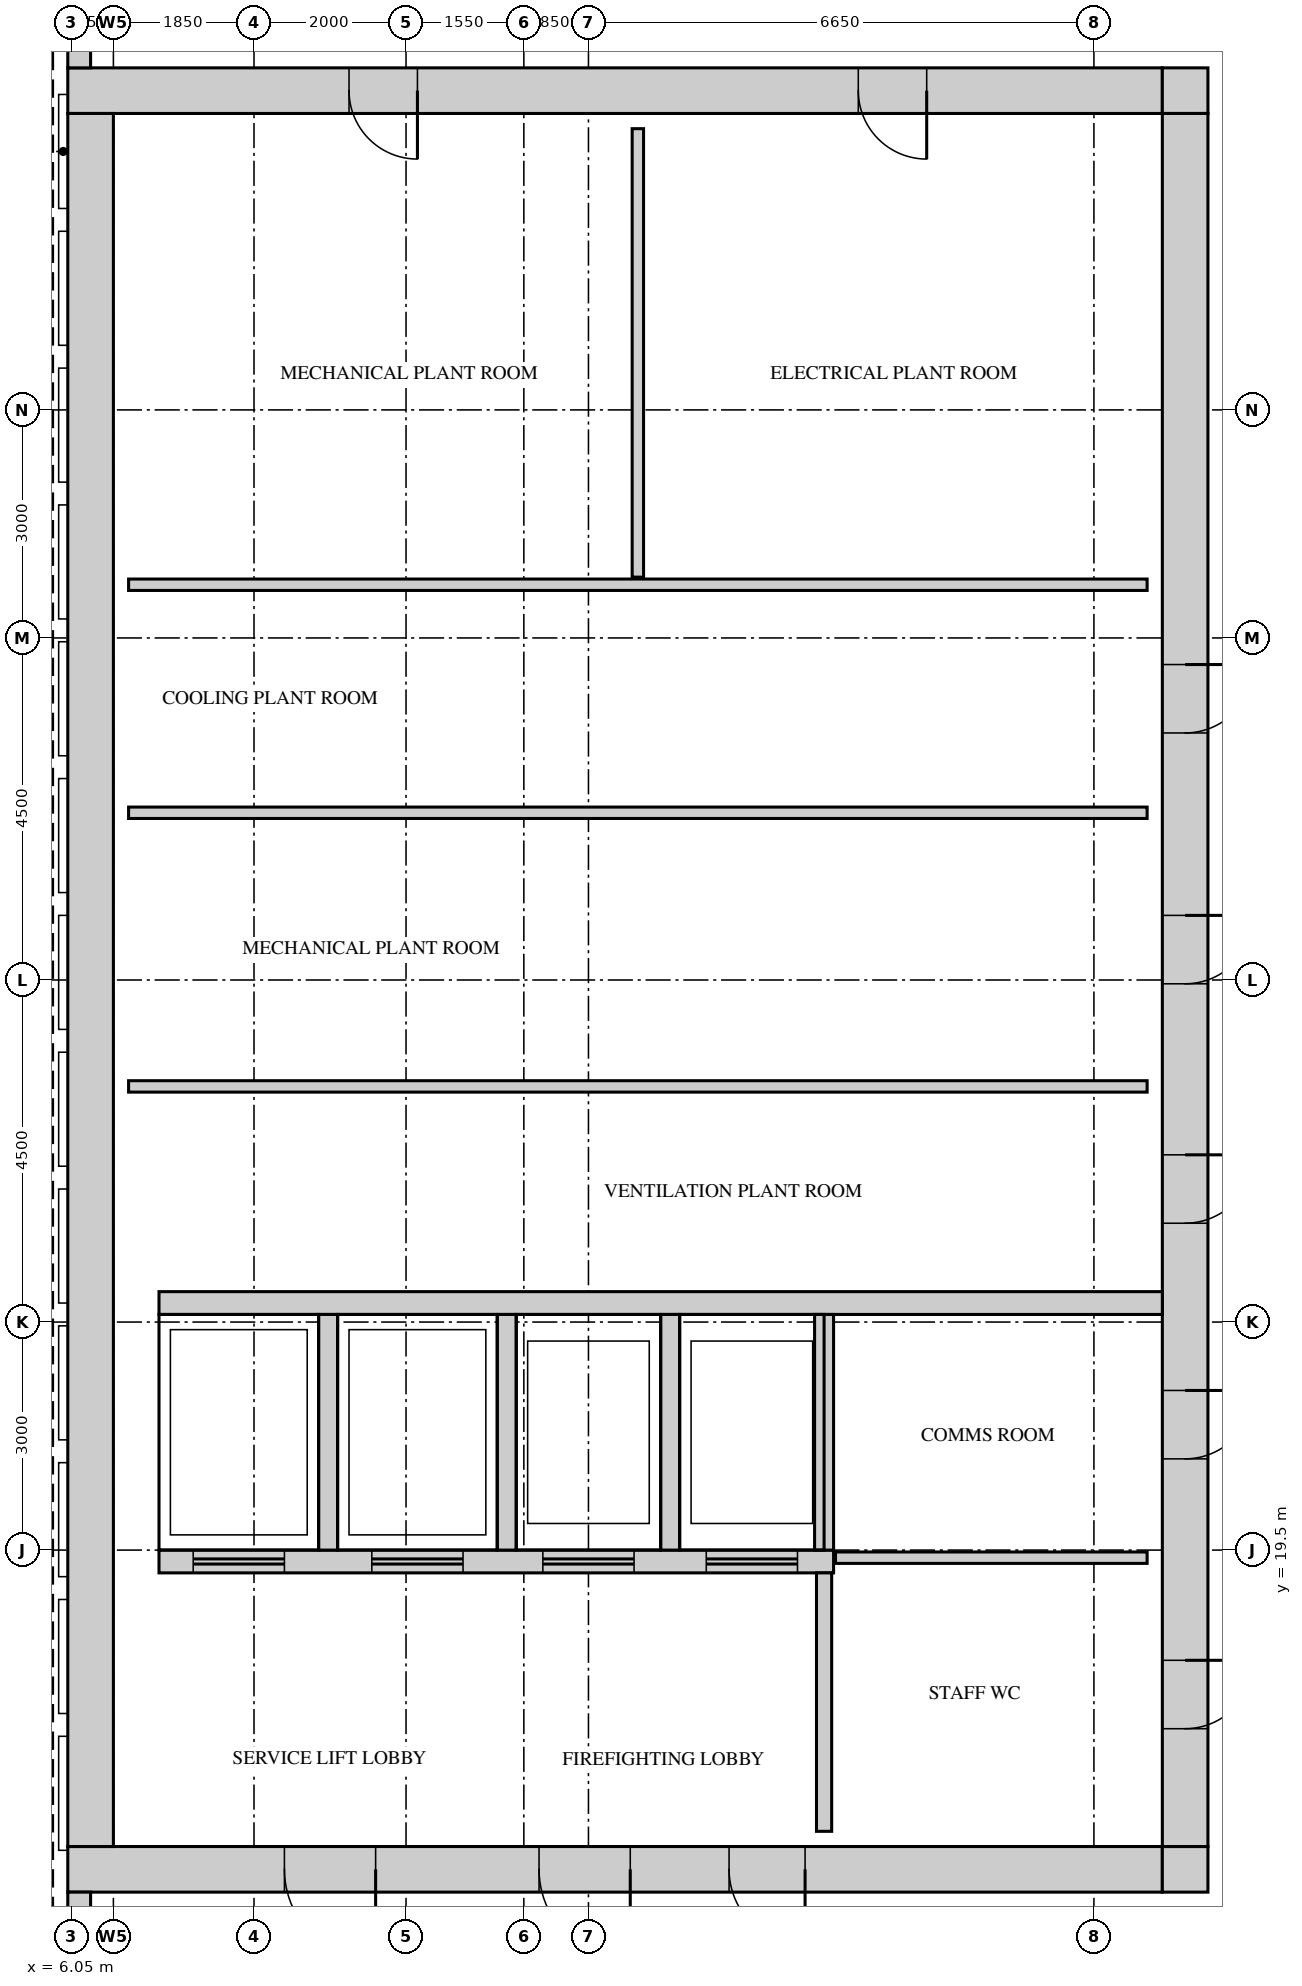
"""IFC4 building model, lengths in metres.
Left out: names, types, materials, properties, quantities, classifications, styles, units other than length and angle.
Written with IfcOpenShell. Run it as: python <this file> out.ifc"""

import sys

from ifc_helpers import new_model, si_unit, direction, frame, frame_2d, origin, place, context, subcontext, project, spatial, rectangle, extrude, source, transform, mapped, element, fill, save


model = new_model("IFC4")
c1 = context("Model", 3, precision=1e-05, world=origin(), true_north=direction((0.0, 1.0)))
c2 = subcontext(c1, "Body", "Model", "MODEL_VIEW")
j1 = project(units=[si_unit("LENGTHUNIT", "METRE"), si_unit("PLANEANGLEUNIT", "RADIAN")], contexts=[c1])
p1 = place(None, origin())
s1 = spatial("IfcSite", under=j1, at=p1, CompositionType="ELEMENT")
p2 = place(p1, origin())
s2 = spatial("IfcBuilding", under=s1, at=p2, CompositionType="ELEMENT")
p3 = place(p2, frame((0.0, 0.0, 348.2)))
s3 = spatial("IfcBuildingStorey", under=s2, at=p3, CompositionType="ELEMENT", Elevation=348.2)
m1 = source(origin(), c2, "Body", "SweptSolid", [
    extrude(rectangle(XDim=14.4, YDim=0.6, at=frame_2d((7.2, 0.0))), origin(), (0.0, 0.0, 1.0), 4.25),
])
p4 = place(p3, frame((6.0, 38.7, 0.0), z_axis=(0.0, 0.0, 1.0), x_axis=(1.0, 0.0, 0.0)))
e1 = element("IfcWall", 1, at=p4, inside=s3, PredefinedType="SHEAR", context=c2, shape_type="MappedRepresentation", body=[
    mapped(m1, transform((0.0, 0.0, 0.0))),
])
m2 = source(origin(), c2, "Body", "SweptSolid", [
    extrude(rectangle(XDim=0.9, YDim=2.1, at=frame_2d((0.45, 1.05))), frame((0.0, 0.31, 0.0), z_axis=(0.0, -1.0, 0.0), x_axis=(1.0, 0.0, 0.0)), (0.0, 0.0, 1.0), 0.62),
])
p5 = place(p4, frame((3.7, 0.0, 0.0)))
e2 = element("IfcOpeningElement", 2, at=p5, cuts=e1, PredefinedType="OPENING", context=c2, shape_type="MappedRepresentation", body=[
    mapped(m2, transform((0.0, 0.0, 0.0))),
])
p6 = place(p4, frame((10.4, 0.0, 0.0)))
e3 = element("IfcOpeningElement", 3, at=p6, cuts=e1, PredefinedType="OPENING", context=c2, shape_type="MappedRepresentation", body=[
    mapped(m2, transform((0.0, 0.0, 0.0))),
])
m3 = source(origin(), c2, "Body", "SweptSolid", [
    extrude(rectangle(XDim=0.6, YDim=0.6, at=frame_2d((0.3, 0.0))), origin(), (0.0, 0.0, 1.0), 4.25),
])
p7 = place(p3, frame((20.4, 38.7, 0.0), z_axis=(0.0, 0.0, 1.0), x_axis=(1.0, 0.0, 0.0)))
e4 = element("IfcWall", 4, at=p7, inside=s3, PredefinedType="SHEAR", context=c2, shape_type="MappedRepresentation", body=[
    mapped(m3, transform((0.0, 0.0, 0.0))),
])
p8 = place(p3, frame((6.0, 15.3, 0.0), z_axis=(0.0, 0.0, 1.0), x_axis=(1.0, 0.0, 0.0)))
e5 = element("IfcWall", 5, at=p8, inside=s3, PredefinedType="SHEAR", context=c2, shape_type="MappedRepresentation", body=[
    mapped(m1, transform((0.0, 0.0, 0.0))),
])
m4 = source(origin(), c2, "Body", "SweptSolid", [
    extrude(rectangle(XDim=1.2, YDim=2.1, at=frame_2d((0.6, 1.05))), frame((0.0, 0.31, 0.0), z_axis=(0.0, -1.0, 0.0), x_axis=(1.0, 0.0, 0.0)), (0.0, 0.0, 1.0), 0.62),
])
p9 = place(p8, frame((6.2, 0.0, 0.0)))
e6 = element("IfcOpeningElement", 6, at=p9, cuts=e5, PredefinedType="OPENING", context=c2, shape_type="MappedRepresentation", body=[
    mapped(m4, transform((0.0, 0.0, 0.0))),
])
p10 = place(p8, frame((2.85, 0.0, 0.0)))
e7 = element("IfcOpeningElement", 7, at=p10, cuts=e5, PredefinedType="OPENING", context=c2, shape_type="MappedRepresentation", body=[
    mapped(m4, transform((0.0, 0.0, 0.0))),
])
m5 = source(origin(), c2, "Body", "SweptSolid", [
    extrude(rectangle(XDim=1.0, YDim=2.1, at=frame_2d((0.5, 1.05))), frame((0.0, 0.31, 0.0), z_axis=(0.0, -1.0, 0.0), x_axis=(1.0, 0.0, 0.0)), (0.0, 0.0, 1.0), 0.62),
])
p11 = place(p8, frame((8.7, 0.0, 0.0)))
e8 = element("IfcOpeningElement", 8, at=p11, cuts=e5, PredefinedType="OPENING", context=c2, shape_type="MappedRepresentation", body=[
    mapped(m5, transform((0.0, 0.0, 0.0))),
])
p12 = place(p3, frame((20.4, 15.3, 0.0), z_axis=(0.0, 0.0, 1.0), x_axis=(1.0, 0.0, 0.0)))
e9 = element("IfcWall", 9, at=p12, inside=s3, PredefinedType="SHEAR", context=c2, shape_type="MappedRepresentation", body=[
    mapped(m3, transform((0.0, 0.0, 0.0))),
])
m6 = source(origin(), c2, "Body", "SweptSolid", [
    extrude(rectangle(XDim=22.8, YDim=0.6, at=frame_2d((11.4, 0.0))), origin(), (0.0, 0.0, 1.0), 4.25),
])
p13 = place(p3, frame((20.7, 15.6, 0.0), z_axis=(0.0, 0.0, 1.0), x_axis=(0.0, 1.0, 0.0)))
e10 = element("IfcWall", 10, at=p13, inside=s3, PredefinedType="SHEAR", context=c2, shape_type="MappedRepresentation", body=[
    mapped(m6, transform((0.0, 0.0, 0.0))),
])
p14 = place(p13, frame((8.2, 0.0, 0.0)))
e11 = element("IfcOpeningElement", 11, at=p14, cuts=e10, PredefinedType="OPENING", context=c2, shape_type="MappedRepresentation", body=[
    mapped(m2, transform((0.0, 0.0, 0.0))),
])
p15 = place(p13, frame((11.35, 0.0, 0.0)))
e12 = element("IfcOpeningElement", 12, at=p15, cuts=e10, PredefinedType="OPENING", context=c2, shape_type="MappedRepresentation", body=[
    mapped(m2, transform((0.0, 0.0, 0.0))),
])
p16 = place(p13, frame((14.65, 0.0, 0.0)))
e13 = element("IfcOpeningElement", 13, at=p16, cuts=e10, PredefinedType="OPENING", context=c2, shape_type="MappedRepresentation", body=[
    mapped(m2, transform((0.0, 0.0, 0.0))),
])
p17 = place(p13, frame((1.55, 0.0, 0.0)))
e14 = element("IfcOpeningElement", 14, at=p17, cuts=e10, PredefinedType="OPENING", context=c2, shape_type="MappedRepresentation", body=[
    mapped(m2, transform((0.0, 0.0, 0.0))),
])
p18 = place(p13, frame((5.1, 0.0, 0.0)))
e15 = element("IfcOpeningElement", 15, at=p18, cuts=e10, PredefinedType="OPENING", context=c2, shape_type="MappedRepresentation", body=[
    mapped(m2, transform((0.0, 0.0, 0.0))),
])
p19 = place(p3, frame((6.3, 15.6, 0.0), z_axis=(0.0, 0.0, 1.0), x_axis=(0.0, 1.0, 0.0)))
e16 = element("IfcWall", 16, at=p19, inside=s3, PredefinedType="SHEAR", context=c2, shape_type="MappedRepresentation", body=[
    mapped(m6, transform((0.0, 0.0, 0.0))),
])
m7 = source(origin(), c2, "Body", "SweptSolid", [
    extrude(rectangle(XDim=13.2, YDim=0.3, at=frame_2d((6.6, 0.0))), origin(), (0.0, 0.0, 1.0), 4.25),
])
p20 = place(p3, frame((7.2, 22.75, 0.0), z_axis=(0.0, 0.0, 1.0), x_axis=(1.0, 0.0, 0.0)))
e17 = element("IfcWall", 17, at=p20, inside=s3, PredefinedType="STANDARD", context=c2, shape_type="MappedRepresentation", body=[
    mapped(m7, transform((0.0, 0.0, 0.0))),
])
m8 = source(origin(), c2, "Body", "SweptSolid", [
    extrude(rectangle(XDim=8.875, YDim=0.3, at=frame_2d((4.438, 0.0))), origin(), (0.0, 0.0, 1.0), 4.25),
])
p21 = place(p3, frame((7.2, 19.35, 0.0), z_axis=(0.0, 0.0, 1.0), x_axis=(1.0, 0.0, 0.0)))
e18 = element("IfcWall", 18, at=p21, inside=s3, PredefinedType="STANDARD", context=c2, shape_type="MappedRepresentation", body=[
    mapped(m8, transform((0.0, 0.0, 0.0))),
])
m9 = source(origin(), c2, "Body", "SweptSolid", [
    extrude(rectangle(XDim=1.2, YDim=2.1, at=frame_2d((0.6, 1.05))), frame((0.0, 0.16, 0.0), z_axis=(0.0, -1.0, 0.0), x_axis=(1.0, 0.0, 0.0)), (0.0, 0.0, 1.0), 0.32),
])
p22 = place(p21, frame((0.45, 0.0, 0.0)))
e19 = element("IfcOpeningElement", 19, at=p22, cuts=e18, PredefinedType="OPENING", context=c2, shape_type="MappedRepresentation", body=[
    mapped(m9, transform((0.0, 0.0, 0.0))),
])
p23 = place(p21, frame((2.8, 0.0, 0.0)))
e20 = element("IfcOpeningElement", 20, at=p23, cuts=e18, PredefinedType="OPENING", context=c2, shape_type="MappedRepresentation", body=[
    mapped(m9, transform((0.0, 0.0, 0.0))),
])
p24 = place(p21, frame((5.05, 0.0, 0.0)))
e21 = element("IfcOpeningElement", 21, at=p24, cuts=e18, PredefinedType="OPENING", context=c2, shape_type="MappedRepresentation", body=[
    mapped(m9, transform((0.0, 0.0, 0.0))),
])
p25 = place(p21, frame((7.2, 0.0, 0.0)))
e22 = element("IfcOpeningElement", 22, at=p25, cuts=e18, PredefinedType="OPENING", context=c2, shape_type="MappedRepresentation", body=[
    mapped(m9, transform((0.0, 0.0, 0.0))),
])
m10 = source(origin(), c2, "Body", "SweptSolid", [
    extrude(rectangle(XDim=3.1, YDim=0.25, at=frame_2d((1.55, 0.0))), origin(), (0.0, 0.0, 1.0), 4.25),
])
for number, where, z_axis, x_axis in (
    (23, (9.425, 19.5, 0.0), (0.0, 0.0, 1.0), (0.0, 1.0, 0.0)),
    (24, (11.775, 19.5, 0.0), (0.0, 0.0, 1.0), (0.0, 1.0, 0.0)),
    (25, (13.925, 19.5, 0.0), (0.0, 0.0, 1.0), (0.0, 1.0, 0.0)),
    (26, (15.95, 19.5, 0.0), (0.0, 0.0, 1.0), (0.0, 1.0, 0.0)),
):
    element("IfcWall", number, at=place(p3, frame(where, z_axis=z_axis, x_axis=x_axis)), inside=s3, PredefinedType="STANDARD", context=c2, shape_type="MappedRepresentation", body=[
        mapped(m10, transform((0.0, 0.0, 0.0))),
    ])
m11 = source(origin(), c2, "Body", "SweptSolid", [
    extrude(rectangle(XDim=2.7, YDim=0.3, at=frame_2d((1.35, 0.0))), origin(), (0.0, 0.0, 1.0), 4.5),
])
p26 = place(p3, frame((6.15, 41.7, 0.0), z_axis=(0.0, 0.0, 1.0), x_axis=(0.0, -1.0, 0.0)))
e27 = element("IfcWall", 27, at=p26, inside=s3, PredefinedType="SOLIDWALL", context=c2, shape_type="MappedRepresentation", body=[
    mapped(m11, transform((0.0, 0.0, 0.0))),
])
m12 = source(origin(), c2, "Body", "SweptSolid", [
    extrude(rectangle(XDim=1.2, YDim=2.4, at=frame_2d((0.6, 1.2))), frame((0.0, 0.16, 0.0), z_axis=(0.0, -1.0, 0.0), x_axis=(1.0, 0.0, 0.0)), (0.0, 0.0, 1.0), 0.32),
])
p27 = place(p26, frame((0.75, 0.0, 0.9)))
e28 = element("IfcOpeningElement", 28, at=p27, cuts=e27, PredefinedType="OPENING", context=c2, shape_type="MappedRepresentation", body=[
    mapped(m12, transform((0.0, 0.0, 0.0))),
])
m13 = source(origin(), c2, "Body", "SweptSolid", [
    extrude(rectangle(XDim=3.0, YDim=0.3, at=frame_2d((1.5, 0.0))), origin(), (0.0, 0.0, 1.0), 4.5),
])
p28 = place(p3, frame((6.15, 15.0, 0.0), z_axis=(0.0, 0.0, 1.0), x_axis=(0.0, -1.0, 0.0)))
e29 = element("IfcWall", 29, at=p28, inside=s3, PredefinedType="SOLIDWALL", context=c2, shape_type="MappedRepresentation", body=[
    mapped(m13, transform((0.0, 0.0, 0.0))),
])
p29 = place(p28, frame((0.9, 0.0, 0.9)))
e30 = element("IfcOpeningElement", 30, at=p29, cuts=e29, PredefinedType="OPENING", context=c2, shape_type="MappedRepresentation", body=[
    mapped(m12, transform((0.0, 0.0, 0.0))),
])
m14 = source(origin(), c2, "Body", "SweptSolid", [
    extrude(rectangle(XDim=3.4, YDim=0.2, at=frame_2d((1.7, 0.0))), origin(), (0.0, 0.0, 1.0), 4.3),
])
p30 = place(p3, frame((15.95, 15.8, 0.0), z_axis=(0.0, 0.0, 1.0), x_axis=(0.0, 1.0, 0.0)))
e31 = element("IfcWall", 31, at=p30, inside=s3, PredefinedType="PARTITIONING", context=c2, shape_type="MappedRepresentation", body=[
    mapped(m14, transform((0.0, 0.0, 0.0))),
])
m15 = source(origin(), c2, "Body", "SweptSolid", [
    extrude(rectangle(XDim=4.1, YDim=0.15, at=frame_2d((2.05, 0.0))), origin(), (0.0, 0.0, 1.0), 4.3),
])
p31 = place(p3, frame((16.1, 19.4, 0.0), z_axis=(0.0, 0.0, 1.0), x_axis=(1.0, 0.0, 0.0)))
e32 = element("IfcWall", 32, at=p31, inside=s3, PredefinedType="PARTITIONING", context=c2, shape_type="MappedRepresentation", body=[
    mapped(m15, transform((0.0, 0.0, 0.0))),
])
m16 = source(origin(), c2, "Body", "SweptSolid", [
    extrude(rectangle(XDim=13.4, YDim=0.15, at=frame_2d((6.7, 0.0))), origin(), (0.0, 0.0, 1.0), 4.3),
])
for number, where, z_axis, x_axis in (
    (33, (6.8, 25.6, 0.0), (0.0, 0.0, 1.0), (1.0, 0.0, 0.0)),
    (34, (6.8, 29.2, 0.0), (0.0, 0.0, 1.0), (1.0, 0.0, 0.0)),
    (35, (6.8, 32.2, 0.0), (0.0, 0.0, 1.0), (1.0, 0.0, 0.0)),
):
    element("IfcWall", number, at=place(p3, frame(where, z_axis=z_axis, x_axis=x_axis)), inside=s3, PredefinedType="PARTITIONING", context=c2, shape_type="MappedRepresentation", body=[
        mapped(m16, transform((0.0, 0.0, 0.0))),
    ])
m17 = source(origin(), c2, "Body", "SweptSolid", [
    extrude(rectangle(XDim=5.9, YDim=0.15, at=frame_2d((2.95, 0.0))), origin(), (0.0, 0.0, 1.0), 4.3),
])
p32 = place(p3, frame((13.5, 32.3, 0.0), z_axis=(0.0, 0.0, 1.0), x_axis=(0.0, 1.0, 0.0)))
e36 = element("IfcWall", 36, at=p32, inside=s3, PredefinedType="PARTITIONING", context=c2, shape_type="MappedRepresentation", body=[
    mapped(m17, transform((0.0, 0.0, 0.0))),
])
m18 = source(origin(), c2, "Body", "SweptSolid", [
    extrude(rectangle(XDim=0.9, YDim=2.1, at=frame_2d((0.45, 1.05))), frame((0.0, 0.25, 0.0), z_axis=(0.0, -1.0, 0.0), x_axis=(1.0, 0.0, 0.0)), (0.0, 0.0, 1.0), 0.5),
])
p33 = place(p14, origin())
e37 = element("IfcDoor", 37, at=p33, inside=s3, OperationType="SINGLE_SWING_RIGHT", PredefinedType="DOOR", context=c2, shape_type="MappedRepresentation", body=[
    mapped(m18, transform((0.0, 0.0, 0.0))),
])
fill(e11, e37)
p34 = place(p15, origin())
e38 = element("IfcDoor", 38, at=p34, inside=s3, OperationType="SINGLE_SWING_RIGHT", PredefinedType="DOOR", context=c2, shape_type="MappedRepresentation", body=[
    mapped(m18, transform((0.0, 0.0, 0.0))),
])
fill(e12, e38)
p35 = place(p16, origin())
e39 = element("IfcDoor", 39, at=p35, inside=s3, OperationType="SINGLE_SWING_RIGHT", PredefinedType="DOOR", context=c2, shape_type="MappedRepresentation", body=[
    mapped(m18, transform((0.0, 0.0, 0.0))),
])
fill(e13, e39)
p36 = place(p5, origin())
e40 = element("IfcDoor", 40, at=p36, inside=s3, OperationType="SINGLE_SWING_RIGHT", PredefinedType="DOOR", context=c2, shape_type="MappedRepresentation", body=[
    mapped(m18, transform((0.0, 0.0, 0.0))),
])
fill(e2, e40)
p37 = place(p6, origin())
e41 = element("IfcDoor", 41, at=p37, inside=s3, OperationType="SINGLE_SWING_RIGHT", PredefinedType="DOOR", context=c2, shape_type="MappedRepresentation", body=[
    mapped(m18, transform((0.0, 0.0, 0.0))),
])
fill(e3, e41)
p38 = place(p17, origin())
e42 = element("IfcDoor", 42, at=p38, inside=s3, OperationType="SINGLE_SWING_RIGHT", PredefinedType="DOOR", context=c2, shape_type="MappedRepresentation", body=[
    mapped(m18, transform((0.0, 0.0, 0.0))),
])
fill(e14, e42)
p39 = place(p18, origin())
e43 = element("IfcDoor", 43, at=p39, inside=s3, OperationType="SINGLE_SWING_RIGHT", PredefinedType="DOOR", context=c2, shape_type="MappedRepresentation", body=[
    mapped(m18, transform((0.0, 0.0, 0.0))),
])
fill(e15, e43)
m19 = source(origin(), c2, "Body", "SweptSolid", [
    extrude(rectangle(XDim=1.2, YDim=2.1, at=frame_2d((0.6, 1.05))), frame((0.0, 0.25, 0.0), z_axis=(0.0, -1.0, 0.0), x_axis=(1.0, 0.0, 0.0)), (0.0, 0.0, 1.0), 0.5),
])
p40 = place(p9, origin())
e44 = element("IfcDoor", 44, at=p40, inside=s3, OperationType="SINGLE_SWING_RIGHT", PredefinedType="DOOR", context=c2, shape_type="MappedRepresentation", body=[
    mapped(m19, transform((0.0, 0.0, 0.0))),
])
fill(e6, e44)
p41 = place(p10, origin())
e45 = element("IfcDoor", 45, at=p41, inside=s3, OperationType="SINGLE_SWING_RIGHT", PredefinedType="DOOR", context=c2, shape_type="MappedRepresentation", body=[
    mapped(m19, transform((0.0, 0.0, 0.0))),
])
fill(e7, e45)
m20 = source(origin(), c2, "Body", "SweptSolid", [
    extrude(rectangle(XDim=1.0, YDim=2.1, at=frame_2d((0.5, 1.05))), frame((0.0, 0.25, 0.0), z_axis=(0.0, -1.0, 0.0), x_axis=(1.0, 0.0, 0.0)), (0.0, 0.0, 1.0), 0.5),
])
p42 = place(p11, origin())
e46 = element("IfcDoor", 46, at=p42, inside=s3, OperationType="SINGLE_SWING_RIGHT", PredefinedType="DOOR", context=c2, shape_type="MappedRepresentation", body=[
    mapped(m20, transform((0.0, 0.0, 0.0))),
])
fill(e8, e46)
m21 = source(origin(), c2, "Body", "SweptSolid", [
    extrude(rectangle(XDim=1.2, YDim=2.1, at=frame_2d((0.6, 1.05))), frame((0.0, 0.025, 0.0), z_axis=(0.0, -1.0, 0.0), x_axis=(1.0, 0.0, 0.0)), (0.0, 0.0, 1.0), 0.05),
])
p43 = place(p22, origin())
e47 = element("IfcDoor", 47, at=p43, inside=s3, OperationType="DOUBLE_DOOR_SLIDING", PredefinedType="DOOR", context=c2, shape_type="MappedRepresentation", body=[
    mapped(m21, transform((0.0, 0.0, 0.0))),
])
fill(e19, e47)
p44 = place(p23, origin())
e48 = element("IfcDoor", 48, at=p44, inside=s3, OperationType="DOUBLE_DOOR_SLIDING", PredefinedType="DOOR", context=c2, shape_type="MappedRepresentation", body=[
    mapped(m21, transform((0.0, 0.0, 0.0))),
])
fill(e20, e48)
p45 = place(p24, origin())
e49 = element("IfcDoor", 49, at=p45, inside=s3, OperationType="DOUBLE_DOOR_SLIDING", PredefinedType="DOOR", context=c2, shape_type="MappedRepresentation", body=[
    mapped(m21, transform((0.0, 0.0, 0.0))),
])
fill(e21, e49)
p46 = place(p25, origin())
e50 = element("IfcDoor", 50, at=p46, inside=s3, OperationType="DOUBLE_DOOR_SLIDING", PredefinedType="DOOR", context=c2, shape_type="MappedRepresentation", body=[
    mapped(m21, transform((0.0, 0.0, 0.0))),
])
fill(e22, e50)
save(model, sys.argv[1])
